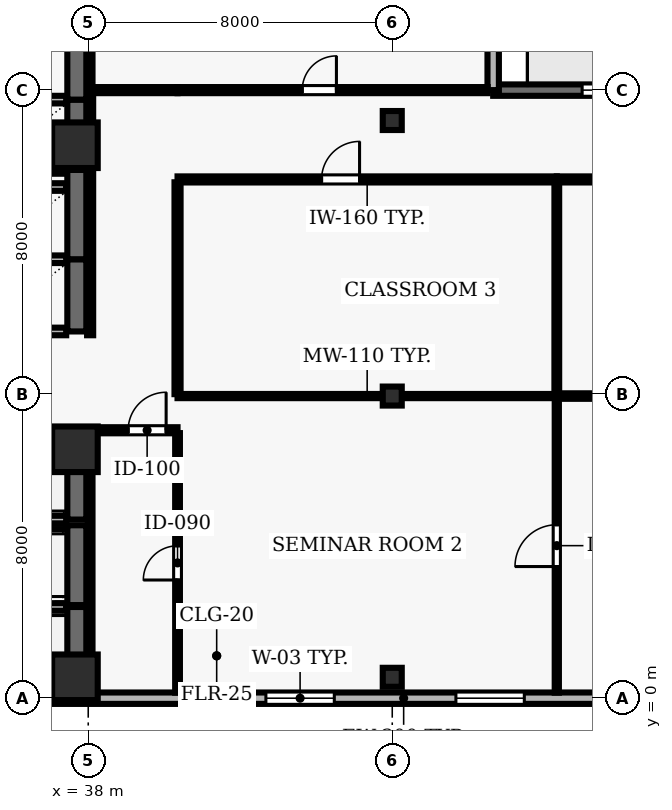
"""IFC4 building model, lengths in metres.
Left out: names, types, materials, properties, quantities, classifications, styles, units other than length and angle.
Written with IfcOpenShell. Run it as: python <this file> out.ifc"""

import sys

from ifc_helpers import new_model, si_unit, direction, frame, frame_2d, origin, origin_2d, place, context, subcontext, project, spatial, rectangle, hollow_rectangle, extrude, element, fill, save


model = new_model("IFC4")
c1 = context("Model", 3, precision=1e-05, world=origin(), true_north=direction((0.0, 1.0)))
c2 = subcontext(c1, "Body", "Model", "MODEL_VIEW")
j1 = project(units=[si_unit("LENGTHUNIT", "METRE"), si_unit("PLANEANGLEUNIT", "RADIAN")], contexts=[c1])
p1 = place(None, origin())
s1 = spatial("IfcSite", under=j1, at=p1, CompositionType="ELEMENT")
p2 = place(p1, origin())
s2 = spatial("IfcBuilding", under=s1, at=p2, CompositionType="ELEMENT")
p3 = place(p2, frame((0.0, 0.0, 111.2)))
s3 = spatial("IfcBuildingStorey", under=s2, at=p3, CompositionType="ELEMENT", Elevation=111.2)
for number, where, z_axis, x_axis in (
    (1, (37.65, 0.55, 0.0), (0.0, 0.0, 1.0), (1.0, 0.0, 0.0)),
    (2, (37.65, 6.55, 0.0), (0.0, 0.0, 1.0), (1.0, 0.0, 0.0)),
    (3, (37.65, 14.55, 0.0), (0.0, 0.0, 1.0), (1.0, 0.0, 0.0)),
):
    element("IfcColumn", number, at=place(p3, frame(where, z_axis=z_axis, x_axis=x_axis)), inside=s3, PredefinedType="COLUMN", context=c2, shape_type="SweptSolid", body=[
        extrude(rectangle(XDim=1.2, YDim=1.2, at=origin_2d()), origin(), (0.0, 0.0, 1.0), 3.9),
    ])
for number, where, z_axis, x_axis in (
    (4, (46.0, 0.55, 0.0), (0.0, 0.0, 1.0), (1.0, 0.0, 0.0)),
    (5, (46.0, 7.95, 0.0), (0.0, 0.0, 1.0), (1.0, 0.0, 0.0)),
    (6, (46.0, 15.2, 0.0), (0.0, 0.0, 1.0), (1.0, 0.0, 0.0)),
):
    element("IfcColumn", number, at=place(p3, frame(where, z_axis=z_axis, x_axis=x_axis)), inside=s3, PredefinedType="COLUMN", context=c2, shape_type="SweptSolid", body=[
        extrude(hollow_rectangle(XDim=0.5, YDim=0.5, WallThickness=0.025, at=origin_2d()), origin(), (0.0, 0.0, 1.0), 3.9),
    ])
p4 = place(p3, frame((24.5, 0.0, 0.0), z_axis=(0.0, 0.0, 1.0), x_axis=(1.0, 0.0, 0.0)))
e7 = element("IfcWall", 7, at=p4, inside=s3, PredefinedType="SOLIDWALL", context=c2, shape_type="SweptSolid", body=[
    extrude(rectangle(XDim=43.6, YDim=0.3, at=frame_2d((21.8, 0.0))), origin(), (0.0, 0.0, 1.0), 3.69),
])
p5 = place(p4, frame((1.825, 0.0, 0.9)))
e8 = element("IfcOpeningElement", 8, at=p5, cuts=e7, PredefinedType="OPENING", context=c2, shape_type="SweptSolid", body=[
    extrude(rectangle(XDim=1.8, YDim=1.6, at=frame_2d((0.9, 0.8))), frame((0.0, 0.16, 0.0), z_axis=(0.0, -1.0, 0.0), x_axis=(1.0, 0.0, 0.0)), (0.0, 0.0, 1.0), 0.32),
])
p6 = place(p4, frame((8.175, 0.0, 0.9)))
e9 = element("IfcOpeningElement", 9, at=p6, cuts=e7, PredefinedType="OPENING", context=c2, shape_type="SweptSolid", body=[
    extrude(rectangle(XDim=1.8, YDim=1.6, at=frame_2d((0.9, 0.8))), frame((0.0, 0.16, 0.0), z_axis=(0.0, -1.0, 0.0), x_axis=(1.0, 0.0, 0.0)), (0.0, 0.0, 1.0), 0.32),
])
p7 = place(p4, frame((18.175, 0.0, 0.9)))
e10 = element("IfcOpeningElement", 10, at=p7, cuts=e7, PredefinedType="OPENING", context=c2, shape_type="SweptSolid", body=[
    extrude(rectangle(XDim=1.8, YDim=1.6, at=frame_2d((0.9, 0.8))), frame((0.0, 0.16, 0.0), z_axis=(0.0, -1.0, 0.0), x_axis=(1.0, 0.0, 0.0)), (0.0, 0.0, 1.0), 0.32),
])
p8 = place(p4, frame((23.175, 0.0, 0.9)))
e11 = element("IfcOpeningElement", 11, at=p8, cuts=e7, PredefinedType="OPENING", context=c2, shape_type="SweptSolid", body=[
    extrude(rectangle(XDim=1.8, YDim=1.6, at=frame_2d((0.9, 0.8))), frame((0.0, 0.16, 0.0), z_axis=(0.0, -1.0, 0.0), x_axis=(1.0, 0.0, 0.0)), (0.0, 0.0, 1.0), 0.32),
])
p9 = place(p4, frame((29.075, 0.0, 0.9)))
e12 = element("IfcOpeningElement", 12, at=p9, cuts=e7, PredefinedType="OPENING", context=c2, shape_type="SweptSolid", body=[
    extrude(rectangle(XDim=1.8, YDim=1.6, at=frame_2d((0.9, 0.8))), frame((0.0, 0.16, 0.0), z_axis=(0.0, -1.0, 0.0), x_axis=(1.0, 0.0, 0.0)), (0.0, 0.0, 1.0), 0.32),
])
p10 = place(p4, frame((39.975, 0.0, 0.9)))
e13 = element("IfcOpeningElement", 13, at=p10, cuts=e7, PredefinedType="OPENING", context=c2, shape_type="SweptSolid", body=[
    extrude(rectangle(XDim=1.8, YDim=1.6, at=frame_2d((0.9, 0.8))), frame((0.0, 0.16, 0.0), z_axis=(0.0, -1.0, 0.0), x_axis=(1.0, 0.0, 0.0)), (0.0, 0.0, 1.0), 0.32),
])
p11 = place(p3, frame((68.1, 16.0, 0.0), z_axis=(0.0, 0.0, 1.0), x_axis=(-1.0, 0.0, 0.0)))
e14 = element("IfcWall", 14, at=p11, inside=s3, PredefinedType="SOLIDWALL", context=c2, shape_type="SweptSolid", body=[
    extrude(rectangle(XDim=19.444, YDim=0.3, at=frame_2d((9.722, 0.0))), origin(), (0.0, 0.0, 1.0), 3.69),
])
p12 = place(p11, frame((6.922, 0.0, 0.0)))
e15 = element("IfcOpeningElement", 15, at=p12, cuts=e14, PredefinedType="OPENING", context=c2, shape_type="SweptSolid", body=[
    extrude(rectangle(XDim=1.0, YDim=2.2, at=frame_2d((0.5, 1.1))), frame((0.0, 0.16, 0.0), z_axis=(0.0, -1.0, 0.0), x_axis=(1.0, 0.0, 0.0)), (0.0, 0.0, 1.0), 0.32),
])
p13 = place(p11, frame((2.341, 0.0, 0.9)))
e16 = element("IfcOpeningElement", 16, at=p13, cuts=e14, PredefinedType="OPENING", context=c2, shape_type="SweptSolid", body=[
    extrude(rectangle(XDim=1.8, YDim=1.8, at=frame_2d((0.9, 0.9))), frame((0.0, 0.16, 0.0), z_axis=(0.0, -1.0, 0.0), x_axis=(1.0, 0.0, 0.0)), (0.0, 0.0, 1.0), 0.32),
])
p14 = place(p11, frame((8.822, 0.0, 0.9)))
e17 = element("IfcOpeningElement", 17, at=p14, cuts=e14, PredefinedType="OPENING", context=c2, shape_type="SweptSolid", body=[
    extrude(rectangle(XDim=1.8, YDim=1.8, at=frame_2d((0.9, 0.9))), frame((0.0, 0.16, 0.0), z_axis=(0.0, -1.0, 0.0), x_axis=(1.0, 0.0, 0.0)), (0.0, 0.0, 1.0), 0.32),
])
p15 = place(p11, frame((15.303, 0.0, 0.9)))
e18 = element("IfcOpeningElement", 18, at=p15, cuts=e14, PredefinedType="OPENING", context=c2, shape_type="SweptSolid", body=[
    extrude(rectangle(XDim=1.8, YDim=1.8, at=frame_2d((0.9, 0.9))), frame((0.0, 0.16, 0.0), z_axis=(0.0, -1.0, 0.0), x_axis=(1.0, 0.0, 0.0)), (0.0, 0.0, 1.0), 0.32),
])
p16 = place(p3, frame((48.656, 16.0, 0.0), z_axis=(0.0, 0.0, 1.0), x_axis=(0.0, 1.0, 0.0)))
e19 = element("IfcWall", 19, at=p16, inside=s3, PredefinedType="SOLIDWALL", context=c2, shape_type="SweptSolid", body=[
    extrude(rectangle(XDim=13.6, YDim=0.3, at=frame_2d((6.8, 0.0))), origin(), (0.0, 0.0, 1.0), 3.69),
])
p17 = place(p16, frame((2.2, 0.0, 0.9)))
e20 = element("IfcOpeningElement", 20, at=p17, cuts=e19, PredefinedType="OPENING", context=c2, shape_type="SweptSolid", body=[
    extrude(rectangle(XDim=2.4, YDim=1.8, at=frame_2d((1.2, 0.9))), frame((0.0, 0.16, 0.0), z_axis=(0.0, -1.0, 0.0), x_axis=(1.0, 0.0, 0.0)), (0.0, 0.0, 1.0), 0.32),
])
p18 = place(p16, frame((9.0, 0.0, 0.9)))
e21 = element("IfcOpeningElement", 21, at=p18, cuts=e19, PredefinedType="OPENING", context=c2, shape_type="SweptSolid", body=[
    extrude(rectangle(XDim=2.4, YDim=1.8, at=frame_2d((1.2, 0.9))), frame((0.0, 0.16, 0.0), z_axis=(0.0, -1.0, 0.0), x_axis=(1.0, 0.0, 0.0)), (0.0, 0.0, 1.0), 0.32),
])
p19 = place(p3, frame((37.7, 0.3, 0.0), z_axis=(0.0, 0.0, 1.0), x_axis=(0.0, 1.0, 0.0)))
e22 = element("IfcWall", 22, at=p19, inside=s3, PredefinedType="SHEAR", context=c2, shape_type="SweptSolid", body=[
    extrude(rectangle(XDim=2.1, YDim=0.5, at=frame_2d((1.05, 0.0))), origin(), (0.0, 0.0, 1.0), 3.69),
])
for number, where, z_axis, x_axis in (
    (23, (35.28, 0.3, 0.0), (0.0, 0.0, 1.0), (1.0, 0.0, 0.0)),
    (24, (37.42, 2.4, 0.0), (0.0, 0.0, 1.0), (-1.0, 0.0, 0.0)),
):
    element("IfcWall", number, at=place(p3, frame(where, z_axis=z_axis, x_axis=x_axis)), inside=s3, PredefinedType="SOLIDWALL", context=c2, shape_type="SweptSolid", body=[
        extrude(rectangle(XDim=2.14, YDim=0.2, at=frame_2d((1.07, 0.0))), origin(), (0.0, 0.0, 1.0), 3.69),
    ])
p20 = place(p3, frame((37.7, 2.45, 0.0), z_axis=(0.0, 0.0, 1.0), x_axis=(0.0, 1.0, 0.0)))
e25 = element("IfcWall", 25, at=p20, inside=s3, PredefinedType="SHEAR", context=c2, shape_type="SweptSolid", body=[
    extrude(rectangle(XDim=2.1, YDim=0.5, at=frame_2d((1.05, 0.0))), origin(), (0.0, 0.0, 1.0), 3.69),
])
p21 = place(p3, frame((37.42, 4.55, 0.0), z_axis=(0.0, 0.0, 1.0), x_axis=(-1.0, 0.0, 0.0)))
e26 = element("IfcWall", 26, at=p21, inside=s3, PredefinedType="SOLIDWALL", context=c2, shape_type="SweptSolid", body=[
    extrude(rectangle(XDim=2.14, YDim=0.2, at=frame_2d((1.07, 0.0))), origin(), (0.0, 0.0, 1.0), 3.69),
])
p22 = place(p3, frame((37.7, 4.7, 0.0), z_axis=(0.0, 0.0, 1.0), x_axis=(0.0, 1.0, 0.0)))
e27 = element("IfcWall", 27, at=p22, inside=s3, PredefinedType="SHEAR", context=c2, shape_type="SweptSolid", body=[
    extrude(rectangle(XDim=2.25, YDim=0.5, at=frame_2d((1.125, 0.0))), origin(), (0.0, 0.0, 1.0), 3.69),
])
for number, where, z_axis, x_axis in (
    (28, (35.28, 4.7, 0.0), (0.0, 0.0, 1.0), (1.0, 0.0, 0.0)),
    (29, (37.42, 6.95, 0.0), (0.0, 0.0, 1.0), (-1.0, 0.0, 0.0)),
):
    element("IfcWall", number, at=place(p3, frame(where, z_axis=z_axis, x_axis=x_axis)), inside=s3, PredefinedType="SOLIDWALL", context=c2, shape_type="SweptSolid", body=[
        extrude(rectangle(XDim=2.14, YDim=0.2, at=frame_2d((1.07, 0.0))), origin(), (0.0, 0.0, 1.0), 3.69),
    ])
p23 = place(p3, frame((37.7, 9.65, 0.0), z_axis=(0.0, 0.0, 1.0), x_axis=(0.0, 1.0, 0.0)))
e30 = element("IfcWall", 30, at=p23, inside=s3, PredefinedType="SHEAR", context=c2, shape_type="SweptSolid", body=[
    extrude(rectangle(XDim=1.9, YDim=0.5, at=frame_2d((0.95, 0.0))), origin(), (0.0, 0.0, 1.0), 3.69),
])
for number, where, z_axis, x_axis in (
    (31, (35.28, 9.65, 0.0), (0.0, 0.0, 1.0), (1.0, 0.0, 0.0)),
    (32, (37.42, 11.55, 0.0), (0.0, 0.0, 1.0), (-1.0, 0.0, 0.0)),
):
    element("IfcWall", number, at=place(p3, frame(where, z_axis=z_axis, x_axis=x_axis)), inside=s3, PredefinedType="SOLIDWALL", context=c2, shape_type="SweptSolid", body=[
        extrude(rectangle(XDim=2.14, YDim=0.2, at=frame_2d((1.07, 0.0))), origin(), (0.0, 0.0, 1.0), 3.69),
    ])
p24 = place(p3, frame((37.7, 11.55, 0.0), z_axis=(0.0, 0.0, 1.0), x_axis=(0.0, 1.0, 0.0)))
e33 = element("IfcWall", 33, at=p24, inside=s3, PredefinedType="SHEAR", context=c2, shape_type="SweptSolid", body=[
    extrude(rectangle(XDim=2.35, YDim=0.5, at=frame_2d((1.175, 0.0))), origin(), (0.0, 0.0, 1.0), 3.69),
])
p25 = place(p3, frame((37.42, 13.45, 0.0), z_axis=(0.0, 0.0, 1.0), x_axis=(-1.0, 0.0, 0.0)))
e34 = element("IfcWall", 34, at=p25, inside=s3, PredefinedType="SOLIDWALL", context=c2, shape_type="SweptSolid", body=[
    extrude(rectangle(XDim=2.14, YDim=0.2, at=frame_2d((1.07, 0.0))), origin(), (0.0, 0.0, 1.0), 3.69),
])
p26 = place(p3, frame((37.7, 13.9, 0.0), z_axis=(0.0, 0.0, 1.0), x_axis=(0.0, 1.0, 0.0)))
e35 = element("IfcWall", 35, at=p26, inside=s3, PredefinedType="SHEAR", context=c2, shape_type="SweptSolid", body=[
    extrude(rectangle(XDim=1.85, YDim=0.5, at=frame_2d((0.925, 0.0))), origin(), (0.0, 0.0, 1.0), 3.69),
])
for number, where, z_axis, x_axis in (
    (36, (35.28, 13.9, 0.0), (0.0, 0.0, 1.0), (1.0, 0.0, 0.0)),
    (37, (37.42, 15.75, 0.0), (0.0, 0.0, 1.0), (-1.0, 0.0, 0.0)),
):
    element("IfcWall", number, at=place(p3, frame(where, z_axis=z_axis, x_axis=x_axis)), inside=s3, PredefinedType="SOLIDWALL", context=c2, shape_type="SweptSolid", body=[
        extrude(rectangle(XDim=2.14, YDim=0.2, at=frame_2d((1.07, 0.0))), origin(), (0.0, 0.0, 1.0), 3.69),
    ])
p27 = place(p3, frame((37.7, 15.75, 0.0), z_axis=(0.0, 0.0, 1.0), x_axis=(0.0, 1.0, 0.0)))
e38 = element("IfcWall", 38, at=p27, inside=s3, PredefinedType="SHEAR", context=c2, shape_type="SweptSolid", body=[
    extrude(rectangle(XDim=1.85, YDim=0.5, at=frame_2d((0.925, 0.0))), origin(), (0.0, 0.0, 1.0), 3.69),
])
p28 = place(p3, frame((38.05, 7.05, 0.0), z_axis=(0.0, 0.0, 1.0), x_axis=(1.0, 0.0, 0.0)))
e39 = element("IfcWall", 39, at=p28, inside=s3, PredefinedType="PARTITIONING", context=c2, shape_type="SweptSolid", body=[
    extrude(rectangle(XDim=2.3, YDim=0.16, at=frame_2d((1.15, 0.0))), origin(), (0.0, 0.0, 1.0), 3.69),
])
p29 = place(p28, frame((1.0, 0.0, 0.0)))
e40 = element("IfcOpeningElement", 40, at=p29, cuts=e39, PredefinedType="OPENING", context=c2, shape_type="SweptSolid", body=[
    extrude(rectangle(XDim=1.0, YDim=2.1, at=frame_2d((0.5, 1.05))), frame((0.0, 0.09, 0.0), z_axis=(0.0, -1.0, 0.0), x_axis=(1.0, 0.0, 0.0)), (0.0, 0.0, 1.0), 0.18),
])
p30 = place(p3, frame((40.35, 13.65, 0.0), z_axis=(0.0, 0.0, 1.0), x_axis=(1.0, 0.0, 0.0)))
e41 = element("IfcWall", 41, at=p30, inside=s3, PredefinedType="PARTITIONING", context=c2, shape_type="SweptSolid", body=[
    extrude(rectangle(XDim=9.98, YDim=0.16, at=frame_2d((4.99, 0.0))), origin(), (0.0, 0.0, 1.0), 3.69),
])
p31 = place(p30, frame((3.79, 0.0, 0.0)))
e42 = element("IfcOpeningElement", 42, at=p31, cuts=e41, PredefinedType="OPENING", context=c2, shape_type="SweptSolid", body=[
    extrude(rectangle(XDim=1.0, YDim=2.1, at=frame_2d((0.5, 1.05))), frame((0.0, 0.09, 0.0), z_axis=(0.0, -1.0, 0.0), x_axis=(1.0, 0.0, 0.0)), (0.0, 0.0, 1.0), 0.18),
])
p32 = place(p3, frame((40.35, 16.0, 0.0), z_axis=(0.0, 0.0, 1.0), x_axis=(-1.0, 0.0, 0.0)))
e43 = element("IfcWall", 43, at=p32, inside=s3, PredefinedType="PARTITIONING", context=c2, shape_type="SweptSolid", body=[
    extrude(rectangle(XDim=2.3, YDim=0.16, at=frame_2d((1.15, 0.0))), origin(), (0.0, 0.0, 1.0), 3.69),
])
p33 = place(p3, frame((40.35, 16.0, 0.0), z_axis=(0.0, 0.0, 1.0), x_axis=(1.0, 0.0, 0.0)))
e44 = element("IfcWall", 44, at=p33, inside=s3, PredefinedType="PARTITIONING", context=c2, shape_type="SweptSolid", body=[
    extrude(rectangle(XDim=8.161, YDim=0.16, at=frame_2d((4.081, 0.0))), origin(), (0.0, 0.0, 1.0), 3.69),
])
p34 = place(p33, frame((3.281, 0.0, 0.0)))
e45 = element("IfcOpeningElement", 45, at=p34, cuts=e44, PredefinedType="OPENING", context=c2, shape_type="SweptSolid", body=[
    extrude(rectangle(XDim=0.9, YDim=2.1, at=frame_2d((0.45, 1.05))), frame((0.0, 0.09, 0.0), z_axis=(0.0, -1.0, 0.0), x_axis=(1.0, 0.0, 0.0)), (0.0, 0.0, 1.0), 0.18),
])
p35 = place(p3, frame((50.33, 7.95, 0.0), z_axis=(0.0, 0.0, 1.0), x_axis=(-1.0, 0.0, 0.0)))
e46 = element("IfcWall", 46, at=p35, inside=s3, PredefinedType="MOVABLE", context=c2, shape_type="SweptSolid", body=[
    extrude(rectangle(XDim=9.98, YDim=0.11, at=frame_2d((4.99, 0.0))), origin(), (0.0, 0.0, 1.0), 3.074),
])
p36 = place(p3, frame((50.33, 13.65, 0.0), z_axis=(0.0, 0.0, 1.0), x_axis=(1.0, 0.0, 0.0)))
e47 = element("IfcWall", 47, at=p36, inside=s3, PredefinedType="PARTITIONING", context=c2, shape_type="SweptSolid", body=[
    extrude(rectangle(XDim=10.29, YDim=0.16, at=frame_2d((5.145, 0.0))), origin(), (0.0, 0.0, 1.0), 3.69),
])
p37 = place(p36, frame((4.695, 0.0, 0.0)))
e48 = element("IfcOpeningElement", 48, at=p37, cuts=e47, PredefinedType="OPENING", context=c2, shape_type="SweptSolid", body=[
    extrude(rectangle(XDim=0.9, YDim=2.1, at=frame_2d((0.45, 1.05))), frame((0.0, 0.09, 0.0), z_axis=(0.0, -1.0, 0.0), x_axis=(1.0, 0.0, 0.0)), (0.0, 0.0, 1.0), 0.18),
])
p38 = place(p3, frame((60.62, 7.95, 0.0), z_axis=(0.0, 0.0, 1.0), x_axis=(-1.0, 0.0, 0.0)))
e49 = element("IfcWall", 49, at=p38, inside=s3, PredefinedType="PARTITIONING", context=c2, shape_type="SweptSolid", body=[
    extrude(rectangle(XDim=10.29, YDim=0.145, at=frame_2d((5.145, 0.0))), origin(), (0.0, 0.0, 1.0), 3.074),
])
p39 = place(p3, frame((38.05, 6.975, 0.0), z_axis=(0.0, 0.0, 1.0), x_axis=(0.0, -1.0, 0.0)))
e50 = element("IfcWall", 50, at=p39, inside=s3, PredefinedType="PARTITIONING", context=c2, shape_type="SweptSolid", body=[
    extrude(rectangle(XDim=6.83, YDim=0.125, at=frame_2d((3.415, 0.0))), origin(), (0.0, 0.0, 1.0), 3.074),
])
p40 = place(p3, frame((38.05, 15.925, 0.0), z_axis=(0.0, 0.0, 1.0), x_axis=(0.0, -1.0, 0.0)))
e51 = element("IfcWall", 51, at=p40, inside=s3, PredefinedType="PARTITIONING", context=c2, shape_type="SweptSolid", body=[
    extrude(rectangle(XDim=6.375, YDim=0.16, at=frame_2d((3.188, 0.0))), origin(), (0.0, 0.0, 1.0), 3.074),
])
p41 = place(p3, frame((38.05, 23.85, 0.0), z_axis=(0.0, 0.0, 1.0), x_axis=(0.0, -1.0, 0.0)))
e52 = element("IfcWall", 52, at=p41, inside=s3, PredefinedType="PARTITIONING", context=c2, shape_type="SweptSolid", body=[
    extrude(rectangle(XDim=7.775, YDim=0.125, at=frame_2d((3.888, 0.0))), origin(), (0.0, 0.0, 1.0), 3.074),
])
p42 = place(p3, frame((40.35, 0.145, 0.0), z_axis=(0.0, 0.0, 1.0), x_axis=(0.0, 1.0, 0.0)))
e53 = element("IfcWall", 53, at=p42, inside=s3, PredefinedType="PARTITIONING", context=c2, shape_type="SweptSolid", body=[
    extrude(rectangle(XDim=6.83, YDim=0.125, at=frame_2d((3.415, 0.0))), origin(), (0.0, 0.0, 1.0), 3.69),
])
p43 = place(p42, frame((2.965, 0.0, 0.0)))
e54 = element("IfcOpeningElement", 54, at=p43, cuts=e53, PredefinedType="OPENING", context=c2, shape_type="SweptSolid", body=[
    extrude(rectangle(XDim=0.9, YDim=2.1, at=frame_2d((0.45, 1.05))), frame((0.0, 0.073, 0.0), z_axis=(0.0, -1.0, 0.0), x_axis=(1.0, 0.0, 0.0)), (0.0, 0.0, 1.0), 0.145),
])
p44 = place(p3, frame((40.35, 8.0, 0.0), z_axis=(0.0, 0.0, 1.0), x_axis=(0.0, 1.0, 0.0)))
e55 = element("IfcWall", 55, at=p44, inside=s3, PredefinedType="PARTITIONING", context=c2, shape_type="SweptSolid", body=[
    extrude(rectangle(XDim=5.575, YDim=0.16, at=frame_2d((2.788, 0.0))), origin(), (0.0, 0.0, 1.0), 3.69),
])
p45 = place(p3, frame((50.33, 0.145, 0.0), z_axis=(0.0, 0.0, 1.0), x_axis=(0.0, 1.0, 0.0)))
e56 = element("IfcWall", 56, at=p45, inside=s3, PredefinedType="MOVABLE", context=c2, shape_type="SweptSolid", body=[
    extrude(rectangle(XDim=7.738, YDim=0.11, at=frame_2d((3.869, 0.0))), origin(), (0.0, 0.0, 1.0), 3.69),
])
p46 = place(p45, frame((3.319, 0.0, 0.0)))
e57 = element("IfcOpeningElement", 57, at=p46, cuts=e56, PredefinedType="OPENING", context=c2, shape_type="SweptSolid", body=[
    extrude(rectangle(XDim=1.1, YDim=2.15, at=frame_2d((0.55, 1.075))), frame((0.0, 0.065, 0.0), z_axis=(0.0, -1.0, 0.0), x_axis=(1.0, 0.0, 0.0)), (0.0, 0.0, 1.0), 0.13),
])
p47 = place(p3, frame((50.33, 8.018, 0.0), z_axis=(0.0, 0.0, 1.0), x_axis=(0.0, 1.0, 0.0)))
e58 = element("IfcWall", 58, at=p47, inside=s3, PredefinedType="PARTITIONING", context=c2, shape_type="SweptSolid", body=[
    extrude(rectangle(XDim=5.557, YDim=0.125, at=frame_2d((2.778, 0.0))), origin(), (0.0, 0.0, 1.0), 3.69),
])
p48 = place(p7, origin())
e59 = element("IfcWindow", 59, at=p48, inside=s3, PartitioningType="SINGLE_PANEL", PredefinedType="WINDOW", context=c2, shape_type="SweptSolid", body=[
    extrude(rectangle(XDim=1.8, YDim=1.6, at=frame_2d((0.9, 0.8))), frame((0.0, 0.03, 0.0), z_axis=(0.0, -1.0, 0.0), x_axis=(1.0, 0.0, 0.0)), (0.0, 0.0, 1.0), 0.06),
])
fill(e10, e59)
p49 = place(p8, origin())
e60 = element("IfcWindow", 60, at=p49, inside=s3, PartitioningType="SINGLE_PANEL", PredefinedType="WINDOW", context=c2, shape_type="SweptSolid", body=[
    extrude(rectangle(XDim=1.8, YDim=1.6, at=frame_2d((0.9, 0.8))), frame((0.0, 0.03, 0.0), z_axis=(0.0, -1.0, 0.0), x_axis=(1.0, 0.0, 0.0)), (0.0, 0.0, 1.0), 0.06),
])
fill(e11, e60)
p50 = place(p15, origin())
e61 = element("IfcWindow", 61, at=p50, inside=s3, PartitioningType="SINGLE_PANEL", PredefinedType="WINDOW", context=c2, shape_type="SweptSolid", body=[
    extrude(rectangle(XDim=1.8, YDim=1.8, at=frame_2d((0.9, 0.9))), frame((0.0, 0.03, 0.0), z_axis=(0.0, -1.0, 0.0), x_axis=(1.0, 0.0, 0.0)), (0.0, 0.0, 1.0), 0.06),
])
fill(e18, e61)
p51 = place(p29, origin())
e62 = element("IfcDoor", 62, at=p51, inside=s3, OperationType="SINGLE_SWING_RIGHT", PredefinedType="DOOR", context=c2, shape_type="SweptSolid", body=[
    extrude(rectangle(XDim=1.0, YDim=2.1, at=frame_2d((0.5, 1.05))), frame((0.0, 0.025, 0.0), z_axis=(0.0, -1.0, 0.0), x_axis=(1.0, 0.0, 0.0)), (0.0, 0.0, 1.0), 0.05),
])
fill(e40, e62)
p52 = place(p43, origin())
e63 = element("IfcDoor", 63, at=p52, inside=s3, OperationType="SINGLE_SWING_LEFT", PredefinedType="DOOR", context=c2, shape_type="SweptSolid", body=[
    extrude(rectangle(XDim=0.9, YDim=2.1, at=frame_2d((0.45, 1.05))), frame((0.0, 0.025, 0.0), z_axis=(0.0, -1.0, 0.0), x_axis=(1.0, 0.0, 0.0)), (0.0, 0.0, 1.0), 0.05),
])
fill(e54, e63)
p53 = place(p31, origin())
e64 = element("IfcDoor", 64, at=p53, inside=s3, OperationType="SINGLE_SWING_RIGHT", PredefinedType="DOOR", context=c2, shape_type="SweptSolid", body=[
    extrude(rectangle(XDim=1.0, YDim=2.1, at=frame_2d((0.5, 1.05))), frame((0.0, 0.025, 0.0), z_axis=(0.0, -1.0, 0.0), x_axis=(1.0, 0.0, 0.0)), (0.0, 0.0, 1.0), 0.05),
])
fill(e42, e64)
p54 = place(p46, origin())
e65 = element("IfcDoor", 65, at=p54, inside=s3, OperationType="SINGLE_SWING_LEFT", PredefinedType="DOOR", context=c2, shape_type="SweptSolid", body=[
    extrude(rectangle(XDim=1.1, YDim=2.15, at=frame_2d((0.55, 1.075))), frame((0.0, 0.025, 0.0), z_axis=(0.0, -1.0, 0.0), x_axis=(1.0, 0.0, 0.0)), (0.0, 0.0, 1.0), 0.05),
])
fill(e57, e65)
p55 = place(p34, origin())
e66 = element("IfcDoor", 66, at=p55, inside=s3, OperationType="SINGLE_SWING_RIGHT", PredefinedType="DOOR", context=c2, shape_type="SweptSolid", body=[
    extrude(rectangle(XDim=0.9, YDim=2.1, at=frame_2d((0.45, 1.05))), frame((0.0, 0.025, 0.0), z_axis=(0.0, -1.0, 0.0), x_axis=(1.0, 0.0, 0.0)), (0.0, 0.0, 1.0), 0.05),
])
fill(e45, e66)
save(model, sys.argv[1])
